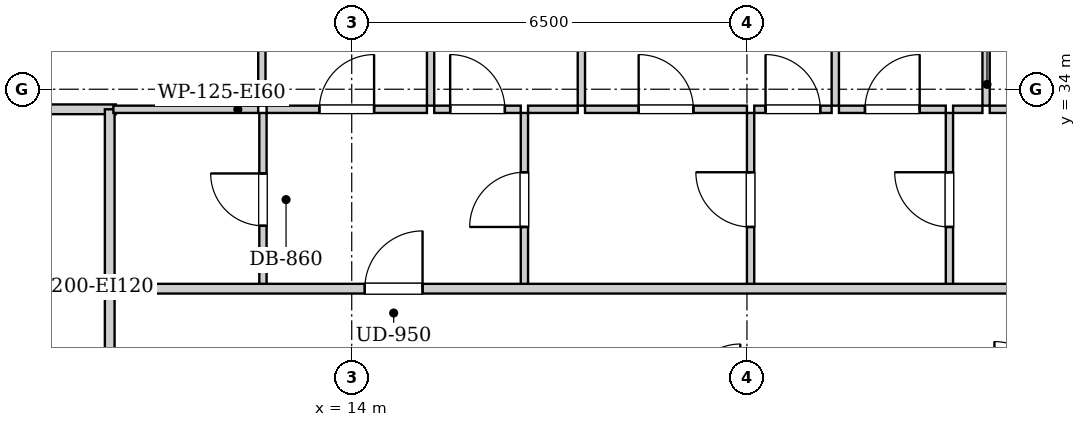
"""IFC4 building model, lengths in metres.
Left out: names, types, materials, properties, quantities, classifications, styles, units other than length and angle.
Written with IfcOpenShell. Run it as: python <this file> out.ifc"""

import sys

from ifc_helpers import new_model, si_unit, direction, frame, frame_2d, origin, place, context, subcontext, project, spatial, rectangle, extrude, element, fill, save


model = new_model("IFC4")
c1 = context("Model", 3, precision=1e-05, world=origin(), true_north=direction((0.0, 1.0)))
c2 = subcontext(c1, "Body", "Model", "MODEL_VIEW")
j1 = project(units=[si_unit("LENGTHUNIT", "METRE"), si_unit("PLANEANGLEUNIT", "RADIAN")], contexts=[c1])
p1 = place(None, origin())
s1 = spatial("IfcSite", under=j1, at=p1, CompositionType="ELEMENT")
p2 = place(p1, origin())
s2 = spatial("IfcBuilding", under=s1, at=p2, CompositionType="ELEMENT")
p3 = place(p2, frame((0.0, 0.0, 51.4)))
s3 = spatial("IfcBuildingStorey", under=s2, at=p3, CompositionType="ELEMENT", Elevation=51.4)
p4 = place(p3, frame((10.02, 28.98, 0.0), z_axis=(0.0, 0.0, 1.0), x_axis=(0.0, 1.0, 0.0)))
e1 = element("IfcWall", 1, at=p4, inside=s3, PredefinedType="PARTITIONING", context=c2, shape_type="SweptSolid", body=[
    extrude(rectangle(XDim=1.74, YDim=0.16, at=frame_2d((0.87, 0.0))), origin(), (0.0, 0.0, 1.0), 2.94),
])
p5 = place(p3, frame((7.78, 33.67, 0.0), z_axis=(0.0, 0.0, 1.0), x_axis=(1.0, 0.0, 0.0)))
e2 = element("IfcWall", 2, at=p5, inside=s3, PredefinedType="PARTITIONING", context=c2, shape_type="SweptSolid", body=[
    extrude(rectangle(XDim=2.34, YDim=0.16, at=frame_2d((1.17, 0.0))), origin(), (0.0, 0.0, 1.0), 2.94),
])
p6 = place(p3, frame((10.02, 30.76, 0.0), z_axis=(0.0, 0.0, 1.0), x_axis=(0.0, 1.0, 0.0)))
e3 = element("IfcWall", 3, at=p6, inside=s3, PredefinedType="PARTITIONING", context=c2, shape_type="SweptSolid", body=[
    extrude(rectangle(XDim=2.91, YDim=0.16, at=frame_2d((1.455, 0.0))), origin(), (0.0, 0.0, 1.0), 2.94),
])
p7 = place(p3, frame((12.54, 30.76, 0.0), z_axis=(0.0, 0.0, 1.0), x_axis=(0.0, 1.0, 0.0)))
e4 = element("IfcWall", 4, at=p7, inside=s3, PredefinedType="PARTITIONING", context=c2, shape_type="SweptSolid", body=[
    extrude(rectangle(XDim=2.85, YDim=0.12, at=frame_2d((1.425, 0.0))), origin(), (0.0, 0.0, 1.0), 2.94),
])
p8 = place(p7, frame((0.995, 0.0, 0.0)))
e5 = element("IfcOpeningElement", 5, at=p8, cuts=e4, PredefinedType="OPENING", context=c2, shape_type="SweptSolid", body=[
    extrude(rectangle(XDim=0.86, YDim=2.05, at=frame_2d((0.43, 1.025))), frame((0.0, 0.07, 0.0), z_axis=(0.0, -1.0, 0.0), x_axis=(1.0, 0.0, 0.0)), (0.0, 0.0, 1.0), 0.14),
])
p9 = place(p3, frame((10.08, 33.67, 0.0), z_axis=(0.0, 0.0, 1.0), x_axis=(1.0, 0.0, 0.0)))
e6 = element("IfcWall", 6, at=p9, inside=s3, PredefinedType="PARTITIONING", context=c2, shape_type="SweptSolid", body=[
    extrude(rectangle(XDim=2.382, YDim=0.12, at=frame_2d((1.191, 0.0))), origin(), (0.0, 0.0, 1.0), 2.94),
])
p10 = place(p3, frame((16.84, 30.76, 0.0), z_axis=(0.0, 0.0, 1.0), x_axis=(0.0, 1.0, 0.0)))
e7 = element("IfcWall", 7, at=p10, inside=s3, PredefinedType="PARTITIONING", context=c2, shape_type="SweptSolid", body=[
    extrude(rectangle(XDim=2.85, YDim=0.12, at=frame_2d((1.425, 0.0))), origin(), (0.0, 0.0, 1.0), 2.94),
])
p11 = place(p10, frame((0.975, 0.0, 0.0)))
e8 = element("IfcOpeningElement", 8, at=p11, cuts=e7, PredefinedType="OPENING", context=c2, shape_type="SweptSolid", body=[
    extrude(rectangle(XDim=0.9, YDim=2.05, at=frame_2d((0.45, 1.025))), frame((0.0, 0.07, 0.0), z_axis=(0.0, -1.0, 0.0), x_axis=(1.0, 0.0, 0.0)), (0.0, 0.0, 1.0), 0.14),
])
p12 = place(p3, frame((12.6, 33.67, 0.0), z_axis=(0.0, 0.0, 1.0), x_axis=(1.0, 0.0, 0.0)))
e9 = element("IfcWall", 9, at=p12, inside=s3, PredefinedType="PARTITIONING", context=c2, shape_type="SweptSolid", body=[
    extrude(rectangle(XDim=2.637, YDim=0.12, at=frame_2d((1.318, 0.0))), origin(), (0.0, 0.0, 1.0), 2.94),
])
p13 = place(p12, frame((0.868, 0.0, 0.0)))
e10 = element("IfcOpeningElement", 10, at=p13, cuts=e9, PredefinedType="OPENING", context=c2, shape_type="SweptSolid", body=[
    extrude(rectangle(XDim=0.9, YDim=2.05, at=frame_2d((0.45, 1.025))), frame((0.0, 0.07, 0.0), z_axis=(0.0, -1.0, 0.0), x_axis=(1.0, 0.0, 0.0)), (0.0, 0.0, 1.0), 0.14),
])
p14 = place(p3, frame((15.357, 33.67, 0.0), z_axis=(0.0, 0.0, 1.0), x_axis=(1.0, 0.0, 0.0)))
e11 = element("IfcWall", 11, at=p14, inside=s3, PredefinedType="PARTITIONING", context=c2, shape_type="SweptSolid", body=[
    extrude(rectangle(XDim=1.423, YDim=0.12, at=frame_2d((0.711, 0.0))), origin(), (0.0, 0.0, 1.0), 2.94),
])
p15 = place(p14, frame((0.262, 0.0, 0.0)))
e12 = element("IfcOpeningElement", 12, at=p15, cuts=e11, PredefinedType="OPENING", context=c2, shape_type="SweptSolid", body=[
    extrude(rectangle(XDim=0.9, YDim=2.05, at=frame_2d((0.45, 1.025))), frame((0.0, 0.07, 0.0), z_axis=(0.0, -1.0, 0.0), x_axis=(1.0, 0.0, 0.0)), (0.0, 0.0, 1.0), 0.14),
])
p16 = place(p3, frame((20.56, 30.76, 0.0), z_axis=(0.0, 0.0, 1.0), x_axis=(0.0, 1.0, 0.0)))
e13 = element("IfcWall", 13, at=p16, inside=s3, PredefinedType="PARTITIONING", context=c2, shape_type="SweptSolid", body=[
    extrude(rectangle(XDim=2.85, YDim=0.12, at=frame_2d((1.425, 0.0))), origin(), (0.0, 0.0, 1.0), 2.94),
])
p17 = place(p16, frame((0.975, 0.0, 0.0)))
e14 = element("IfcOpeningElement", 14, at=p17, cuts=e13, PredefinedType="OPENING", context=c2, shape_type="SweptSolid", body=[
    extrude(rectangle(XDim=0.9, YDim=2.05, at=frame_2d((0.45, 1.025))), frame((0.0, 0.07, 0.0), z_axis=(0.0, -1.0, 0.0), x_axis=(1.0, 0.0, 0.0)), (0.0, 0.0, 1.0), 0.14),
])
p18 = place(p3, frame((16.9, 33.67, 0.0), z_axis=(0.0, 0.0, 1.0), x_axis=(1.0, 0.0, 0.0)))
e15 = element("IfcWall", 15, at=p18, inside=s3, PredefinedType="PARTITIONING", context=c2, shape_type="SweptSolid", body=[
    extrude(rectangle(XDim=0.817, YDim=0.12, at=frame_2d((0.409, 0.0))), origin(), (0.0, 0.0, 1.0), 2.94),
])
p19 = place(p3, frame((17.837, 33.67, 0.0), z_axis=(0.0, 0.0, 1.0), x_axis=(1.0, 0.0, 0.0)))
e16 = element("IfcWall", 16, at=p19, inside=s3, PredefinedType="PARTITIONING", context=c2, shape_type="SweptSolid", body=[
    extrude(rectangle(XDim=2.663, YDim=0.12, at=frame_2d((1.332, 0.0))), origin(), (0.0, 0.0, 1.0), 2.94),
])
p20 = place(p19, frame((0.882, 0.0, 0.0)))
e17 = element("IfcOpeningElement", 17, at=p20, cuts=e16, PredefinedType="OPENING", context=c2, shape_type="SweptSolid", body=[
    extrude(rectangle(XDim=0.9, YDim=2.05, at=frame_2d((0.45, 1.025))), frame((0.0, 0.07, 0.0), z_axis=(0.0, -1.0, 0.0), x_axis=(1.0, 0.0, 0.0)), (0.0, 0.0, 1.0), 0.14),
])
p21 = place(p3, frame((23.83, 30.76, 0.0), z_axis=(0.0, 0.0, 1.0), x_axis=(0.0, 1.0, 0.0)))
e18 = element("IfcWall", 18, at=p21, inside=s3, PredefinedType="PARTITIONING", context=c2, shape_type="SweptSolid", body=[
    extrude(rectangle(XDim=2.85, YDim=0.12, at=frame_2d((1.425, 0.0))), origin(), (0.0, 0.0, 1.0), 2.94),
])
p22 = place(p21, frame((0.975, 0.0, 0.0)))
e19 = element("IfcOpeningElement", 19, at=p22, cuts=e18, PredefinedType="OPENING", context=c2, shape_type="SweptSolid", body=[
    extrude(rectangle(XDim=0.9, YDim=2.05, at=frame_2d((0.45, 1.025))), frame((0.0, 0.07, 0.0), z_axis=(0.0, -1.0, 0.0), x_axis=(1.0, 0.0, 0.0)), (0.0, 0.0, 1.0), 0.14),
])
p23 = place(p3, frame((20.62, 33.67, 0.0), z_axis=(0.0, 0.0, 1.0), x_axis=(1.0, 0.0, 0.0)))
e20 = element("IfcWall", 20, at=p23, inside=s3, PredefinedType="PARTITIONING", context=c2, shape_type="SweptSolid", body=[
    extrude(rectangle(XDim=1.273, YDim=0.12, at=frame_2d((0.636, 0.0))), origin(), (0.0, 0.0, 1.0), 2.94),
])
p24 = place(p23, frame((0.186, 0.0, 0.0)))
e21 = element("IfcOpeningElement", 21, at=p24, cuts=e20, PredefinedType="OPENING", context=c2, shape_type="SweptSolid", body=[
    extrude(rectangle(XDim=0.9, YDim=2.05, at=frame_2d((0.45, 1.025))), frame((0.0, 0.07, 0.0), z_axis=(0.0, -1.0, 0.0), x_axis=(1.0, 0.0, 0.0)), (0.0, 0.0, 1.0), 0.14),
])
p25 = place(p3, frame((22.013, 33.67, 0.0), z_axis=(0.0, 0.0, 1.0), x_axis=(1.0, 0.0, 0.0)))
e22 = element("IfcWall", 22, at=p25, inside=s3, PredefinedType="PARTITIONING", context=c2, shape_type="SweptSolid", body=[
    extrude(rectangle(XDim=1.757, YDim=0.12, at=frame_2d((0.878, 0.0))), origin(), (0.0, 0.0, 1.0), 2.94),
])
p26 = place(p25, frame((0.428, 0.0, 0.0)))
e23 = element("IfcOpeningElement", 23, at=p26, cuts=e22, PredefinedType="OPENING", context=c2, shape_type="SweptSolid", body=[
    extrude(rectangle(XDim=0.9, YDim=2.05, at=frame_2d((0.45, 1.025))), frame((0.0, 0.07, 0.0), z_axis=(0.0, -1.0, 0.0), x_axis=(1.0, 0.0, 0.0)), (0.0, 0.0, 1.0), 0.14),
])
p27 = place(p3, frame((23.89, 33.67, 0.0), z_axis=(0.0, 0.0, 1.0), x_axis=(1.0, 0.0, 0.0)))
e24 = element("IfcWall", 24, at=p27, inside=s3, PredefinedType="PARTITIONING", context=c2, shape_type="SweptSolid", body=[
    extrude(rectangle(XDim=0.483, YDim=0.12, at=frame_2d((0.242, 0.0))), origin(), (0.0, 0.0, 1.0), 2.94),
])
p28 = place(p3, frame((24.493, 33.67, 0.0), z_axis=(0.0, 0.0, 1.0), x_axis=(1.0, 0.0, 0.0)))
e25 = element("IfcWall", 25, at=p28, inside=s3, PredefinedType="PARTITIONING", context=c2, shape_type="SweptSolid", body=[
    extrude(rectangle(XDim=2.997, YDim=0.12, at=frame_2d((1.499, 0.0))), origin(), (0.0, 0.0, 1.0), 2.94),
])
p29 = place(p28, frame((1.048, 0.0, 0.0)))
e26 = element("IfcOpeningElement", 26, at=p29, cuts=e25, PredefinedType="OPENING", context=c2, shape_type="SweptSolid", body=[
    extrude(rectangle(XDim=0.9, YDim=2.05, at=frame_2d((0.45, 1.025))), frame((0.0, 0.07, 0.0), z_axis=(0.0, -1.0, 0.0), x_axis=(1.0, 0.0, 0.0)), (0.0, 0.0, 1.0), 0.14),
])
p30 = place(p3, frame((12.522, 33.73, 0.0), z_axis=(0.0, 0.0, 1.0), x_axis=(0.0, 1.0, 0.0)))
e27 = element("IfcWall", 27, at=p30, inside=s3, PredefinedType="PARTITIONING", context=c2, shape_type="SweptSolid", body=[
    extrude(rectangle(XDim=13.59, YDim=0.12, at=frame_2d((6.795, 0.0))), origin(), (0.0, 0.0, 1.0), 2.94),
])
p31 = place(p30, frame((6.33, 0.0, 0.0)))
e28 = element("IfcOpeningElement", 28, at=p31, cuts=e27, PredefinedType="OPENING", context=c2, shape_type="SweptSolid", body=[
    extrude(rectangle(XDim=0.9, YDim=2.05, at=frame_2d((0.45, 1.025))), frame((0.0, 0.07, 0.0), z_axis=(0.0, -1.0, 0.0), x_axis=(1.0, 0.0, 0.0)), (0.0, 0.0, 1.0), 0.14),
])
p32 = place(p3, frame((15.297, 33.73, 0.0), z_axis=(0.0, 0.0, 1.0), x_axis=(0.0, 1.0, 0.0)))
e29 = element("IfcWall", 29, at=p32, inside=s3, PredefinedType="PARTITIONING", context=c2, shape_type="SweptSolid", body=[
    extrude(rectangle(XDim=13.59, YDim=0.12, at=frame_2d((6.795, 0.0))), origin(), (0.0, 0.0, 1.0), 2.94),
])
p33 = place(p32, frame((6.33, 0.0, 0.0)))
e30 = element("IfcOpeningElement", 30, at=p33, cuts=e29, PredefinedType="OPENING", context=c2, shape_type="SweptSolid", body=[
    extrude(rectangle(XDim=0.9, YDim=2.05, at=frame_2d((0.45, 1.025))), frame((0.0, 0.07, 0.0), z_axis=(0.0, -1.0, 0.0), x_axis=(1.0, 0.0, 0.0)), (0.0, 0.0, 1.0), 0.14),
])
p34 = place(p3, frame((17.777, 33.73, 0.0), z_axis=(0.0, 0.0, 1.0), x_axis=(0.0, 1.0, 0.0)))
e31 = element("IfcWall", 31, at=p34, inside=s3, PredefinedType="PARTITIONING", context=c2, shape_type="SweptSolid", body=[
    extrude(rectangle(XDim=13.59, YDim=0.12, at=frame_2d((6.795, 0.0))), origin(), (0.0, 0.0, 1.0), 2.232),
])
p35 = place(p34, frame((6.33, 0.0, 0.0)))
e32 = element("IfcOpeningElement", 32, at=p35, cuts=e31, PredefinedType="OPENING", context=c2, shape_type="SweptSolid", body=[
    extrude(rectangle(XDim=0.9, YDim=2.05, at=frame_2d((0.45, 1.025))), frame((0.0, 0.07, 0.0), z_axis=(0.0, -1.0, 0.0), x_axis=(1.0, 0.0, 0.0)), (0.0, 0.0, 1.0), 0.14),
])
p36 = place(p3, frame((21.953, 33.73, 0.0), z_axis=(0.0, 0.0, 1.0), x_axis=(0.0, 1.0, 0.0)))
e33 = element("IfcWall", 33, at=p36, inside=s3, PredefinedType="PARTITIONING", context=c2, shape_type="SweptSolid", body=[
    extrude(rectangle(XDim=13.59, YDim=0.12, at=frame_2d((6.795, 0.0))), origin(), (0.0, 0.0, 1.0), 2.94),
])
p37 = place(p36, frame((6.33, 0.0, 0.0)))
e34 = element("IfcOpeningElement", 34, at=p37, cuts=e33, PredefinedType="OPENING", context=c2, shape_type="SweptSolid", body=[
    extrude(rectangle(XDim=0.9, YDim=2.05, at=frame_2d((0.45, 1.025))), frame((0.0, 0.07, 0.0), z_axis=(0.0, -1.0, 0.0), x_axis=(1.0, 0.0, 0.0)), (0.0, 0.0, 1.0), 0.14),
])
p38 = place(p3, frame((24.433, 33.73, 0.0), z_axis=(0.0, 0.0, 1.0), x_axis=(0.0, 1.0, 0.0)))
e35 = element("IfcWall", 35, at=p38, inside=s3, PredefinedType="PARTITIONING", context=c2, shape_type="SweptSolid", body=[
    extrude(rectangle(XDim=13.59, YDim=0.12, at=frame_2d((6.795, 0.0))), origin(), (0.0, 0.0, 1.0), 2.94),
])
p39 = place(p38, frame((6.33, 0.0, 0.0)))
e36 = element("IfcOpeningElement", 36, at=p39, cuts=e35, PredefinedType="OPENING", context=c2, shape_type="SweptSolid", body=[
    extrude(rectangle(XDim=0.9, YDim=2.05, at=frame_2d((0.45, 1.025))), frame((0.0, 0.07, 0.0), z_axis=(0.0, -1.0, 0.0), x_axis=(1.0, 0.0, 0.0)), (0.0, 0.0, 1.0), 0.14),
])
p40 = place(p3, frame((10.05, 30.72, 0.0), z_axis=(0.0, 0.0, 1.0), x_axis=(1.0, 0.0, 0.0)))
e37 = element("IfcWall", 37, at=p40, inside=s3, PredefinedType="PARTITIONING", context=c2, shape_type="SweptSolid", body=[
    extrude(rectangle(XDim=33.9, YDim=0.16, at=frame_2d((16.95, 0.0))), origin(), (0.0, 0.0, 1.0), 2.94),
])
p41 = place(p40, frame((4.165, 0.0, 0.0)))
e38 = element("IfcOpeningElement", 38, at=p41, cuts=e37, PredefinedType="OPENING", context=c2, shape_type="SweptSolid", body=[
    extrude(rectangle(XDim=0.95, YDim=2.1, at=frame_2d((0.475, 1.05))), frame((0.0, 0.09, 0.0), z_axis=(0.0, -1.0, 0.0), x_axis=(1.0, 0.0, 0.0)), (0.0, 0.0, 1.0), 0.18),
])
p42 = place(p40, frame((27.495, 0.0, 0.0)))
e39 = element("IfcOpeningElement", 39, at=p42, cuts=e37, PredefinedType="OPENING", context=c2, shape_type="SweptSolid", body=[
    extrude(rectangle(XDim=0.95, YDim=2.1, at=frame_2d((0.475, 1.05))), frame((0.0, 0.09, 0.0), z_axis=(0.0, -1.0, 0.0), x_axis=(1.0, 0.0, 0.0)), (0.0, 0.0, 1.0), 0.18),
])
p43 = place(p8, origin())
e40 = element("IfcDoor", 40, at=p43, inside=s3, OperationType="SINGLE_SWING_RIGHT", PredefinedType="DOOR", context=c2, shape_type="SweptSolid", body=[
    extrude(rectangle(XDim=0.86, YDim=2.05, at=frame_2d((0.43, 1.025))), frame((0.0, 0.025, 0.0), z_axis=(0.0, -1.0, 0.0), x_axis=(1.0, 0.0, 0.0)), (0.0, 0.0, 1.0), 0.05),
])
fill(e5, e40)
p44 = place(p11, origin())
e41 = element("IfcDoor", 41, at=p44, inside=s3, OperationType="SINGLE_SWING_LEFT", PredefinedType="DOOR", context=c2, shape_type="SweptSolid", body=[
    extrude(rectangle(XDim=0.9, YDim=2.05, at=frame_2d((0.45, 1.025))), frame((0.0, 0.025, 0.0), z_axis=(0.0, -1.0, 0.0), x_axis=(1.0, 0.0, 0.0)), (0.0, 0.0, 1.0), 0.05),
])
fill(e8, e41)
p45 = place(p13, origin())
e42 = element("IfcDoor", 42, at=p45, inside=s3, OperationType="SINGLE_SWING_RIGHT", PredefinedType="DOOR", context=c2, shape_type="SweptSolid", body=[
    extrude(rectangle(XDim=0.9, YDim=2.05, at=frame_2d((0.45, 1.025))), frame((0.0, 0.025, 0.0), z_axis=(0.0, -1.0, 0.0), x_axis=(1.0, 0.0, 0.0)), (0.0, 0.0, 1.0), 0.05),
])
fill(e10, e42)
p46 = place(p15, origin())
e43 = element("IfcDoor", 43, at=p46, inside=s3, OperationType="SINGLE_SWING_LEFT", PredefinedType="DOOR", context=c2, shape_type="SweptSolid", body=[
    extrude(rectangle(XDim=0.9, YDim=2.05, at=frame_2d((0.45, 1.025))), frame((0.0, 0.025, 0.0), z_axis=(0.0, -1.0, 0.0), x_axis=(1.0, 0.0, 0.0)), (0.0, 0.0, 1.0), 0.05),
])
fill(e12, e43)
p47 = place(p17, origin())
e44 = element("IfcDoor", 44, at=p47, inside=s3, OperationType="SINGLE_SWING_RIGHT", PredefinedType="DOOR", context=c2, shape_type="SweptSolid", body=[
    extrude(rectangle(XDim=0.9, YDim=2.05, at=frame_2d((0.45, 1.025))), frame((0.0, 0.025, 0.0), z_axis=(0.0, -1.0, 0.0), x_axis=(1.0, 0.0, 0.0)), (0.0, 0.0, 1.0), 0.05),
])
fill(e14, e44)
p48 = place(p20, origin())
e45 = element("IfcDoor", 45, at=p48, inside=s3, OperationType="SINGLE_SWING_LEFT", PredefinedType="DOOR", context=c2, shape_type="SweptSolid", body=[
    extrude(rectangle(XDim=0.9, YDim=2.05, at=frame_2d((0.45, 1.025))), frame((0.0, 0.025, 0.0), z_axis=(0.0, -1.0, 0.0), x_axis=(1.0, 0.0, 0.0)), (0.0, 0.0, 1.0), 0.05),
])
fill(e17, e45)
p49 = place(p22, origin())
e46 = element("IfcDoor", 46, at=p49, inside=s3, OperationType="SINGLE_SWING_RIGHT", PredefinedType="DOOR", context=c2, shape_type="SweptSolid", body=[
    extrude(rectangle(XDim=0.9, YDim=2.05, at=frame_2d((0.45, 1.025))), frame((0.0, 0.025, 0.0), z_axis=(0.0, -1.0, 0.0), x_axis=(1.0, 0.0, 0.0)), (0.0, 0.0, 1.0), 0.05),
])
fill(e19, e46)
p50 = place(p24, origin())
e47 = element("IfcDoor", 47, at=p50, inside=s3, OperationType="SINGLE_SWING_LEFT", PredefinedType="DOOR", context=c2, shape_type="SweptSolid", body=[
    extrude(rectangle(XDim=0.9, YDim=2.05, at=frame_2d((0.45, 1.025))), frame((0.0, 0.025, 0.0), z_axis=(0.0, -1.0, 0.0), x_axis=(1.0, 0.0, 0.0)), (0.0, 0.0, 1.0), 0.05),
])
fill(e21, e47)
p51 = place(p26, origin())
e48 = element("IfcDoor", 48, at=p51, inside=s3, OperationType="SINGLE_SWING_RIGHT", PredefinedType="DOOR", context=c2, shape_type="SweptSolid", body=[
    extrude(rectangle(XDim=0.9, YDim=2.05, at=frame_2d((0.45, 1.025))), frame((0.0, 0.025, 0.0), z_axis=(0.0, -1.0, 0.0), x_axis=(1.0, 0.0, 0.0)), (0.0, 0.0, 1.0), 0.05),
])
fill(e23, e48)
p52 = place(p41, origin())
e49 = element("IfcDoor", 49, at=p52, inside=s3, OperationType="SINGLE_SWING_RIGHT", PredefinedType="DOOR", context=c2, shape_type="SweptSolid", body=[
    extrude(rectangle(XDim=0.95, YDim=2.1, at=frame_2d((0.475, 1.05))), frame((0.0, 0.025, 0.0), z_axis=(0.0, -1.0, 0.0), x_axis=(1.0, 0.0, 0.0)), (0.0, 0.0, 1.0), 0.05),
])
fill(e38, e49)
save(model, sys.argv[1])
